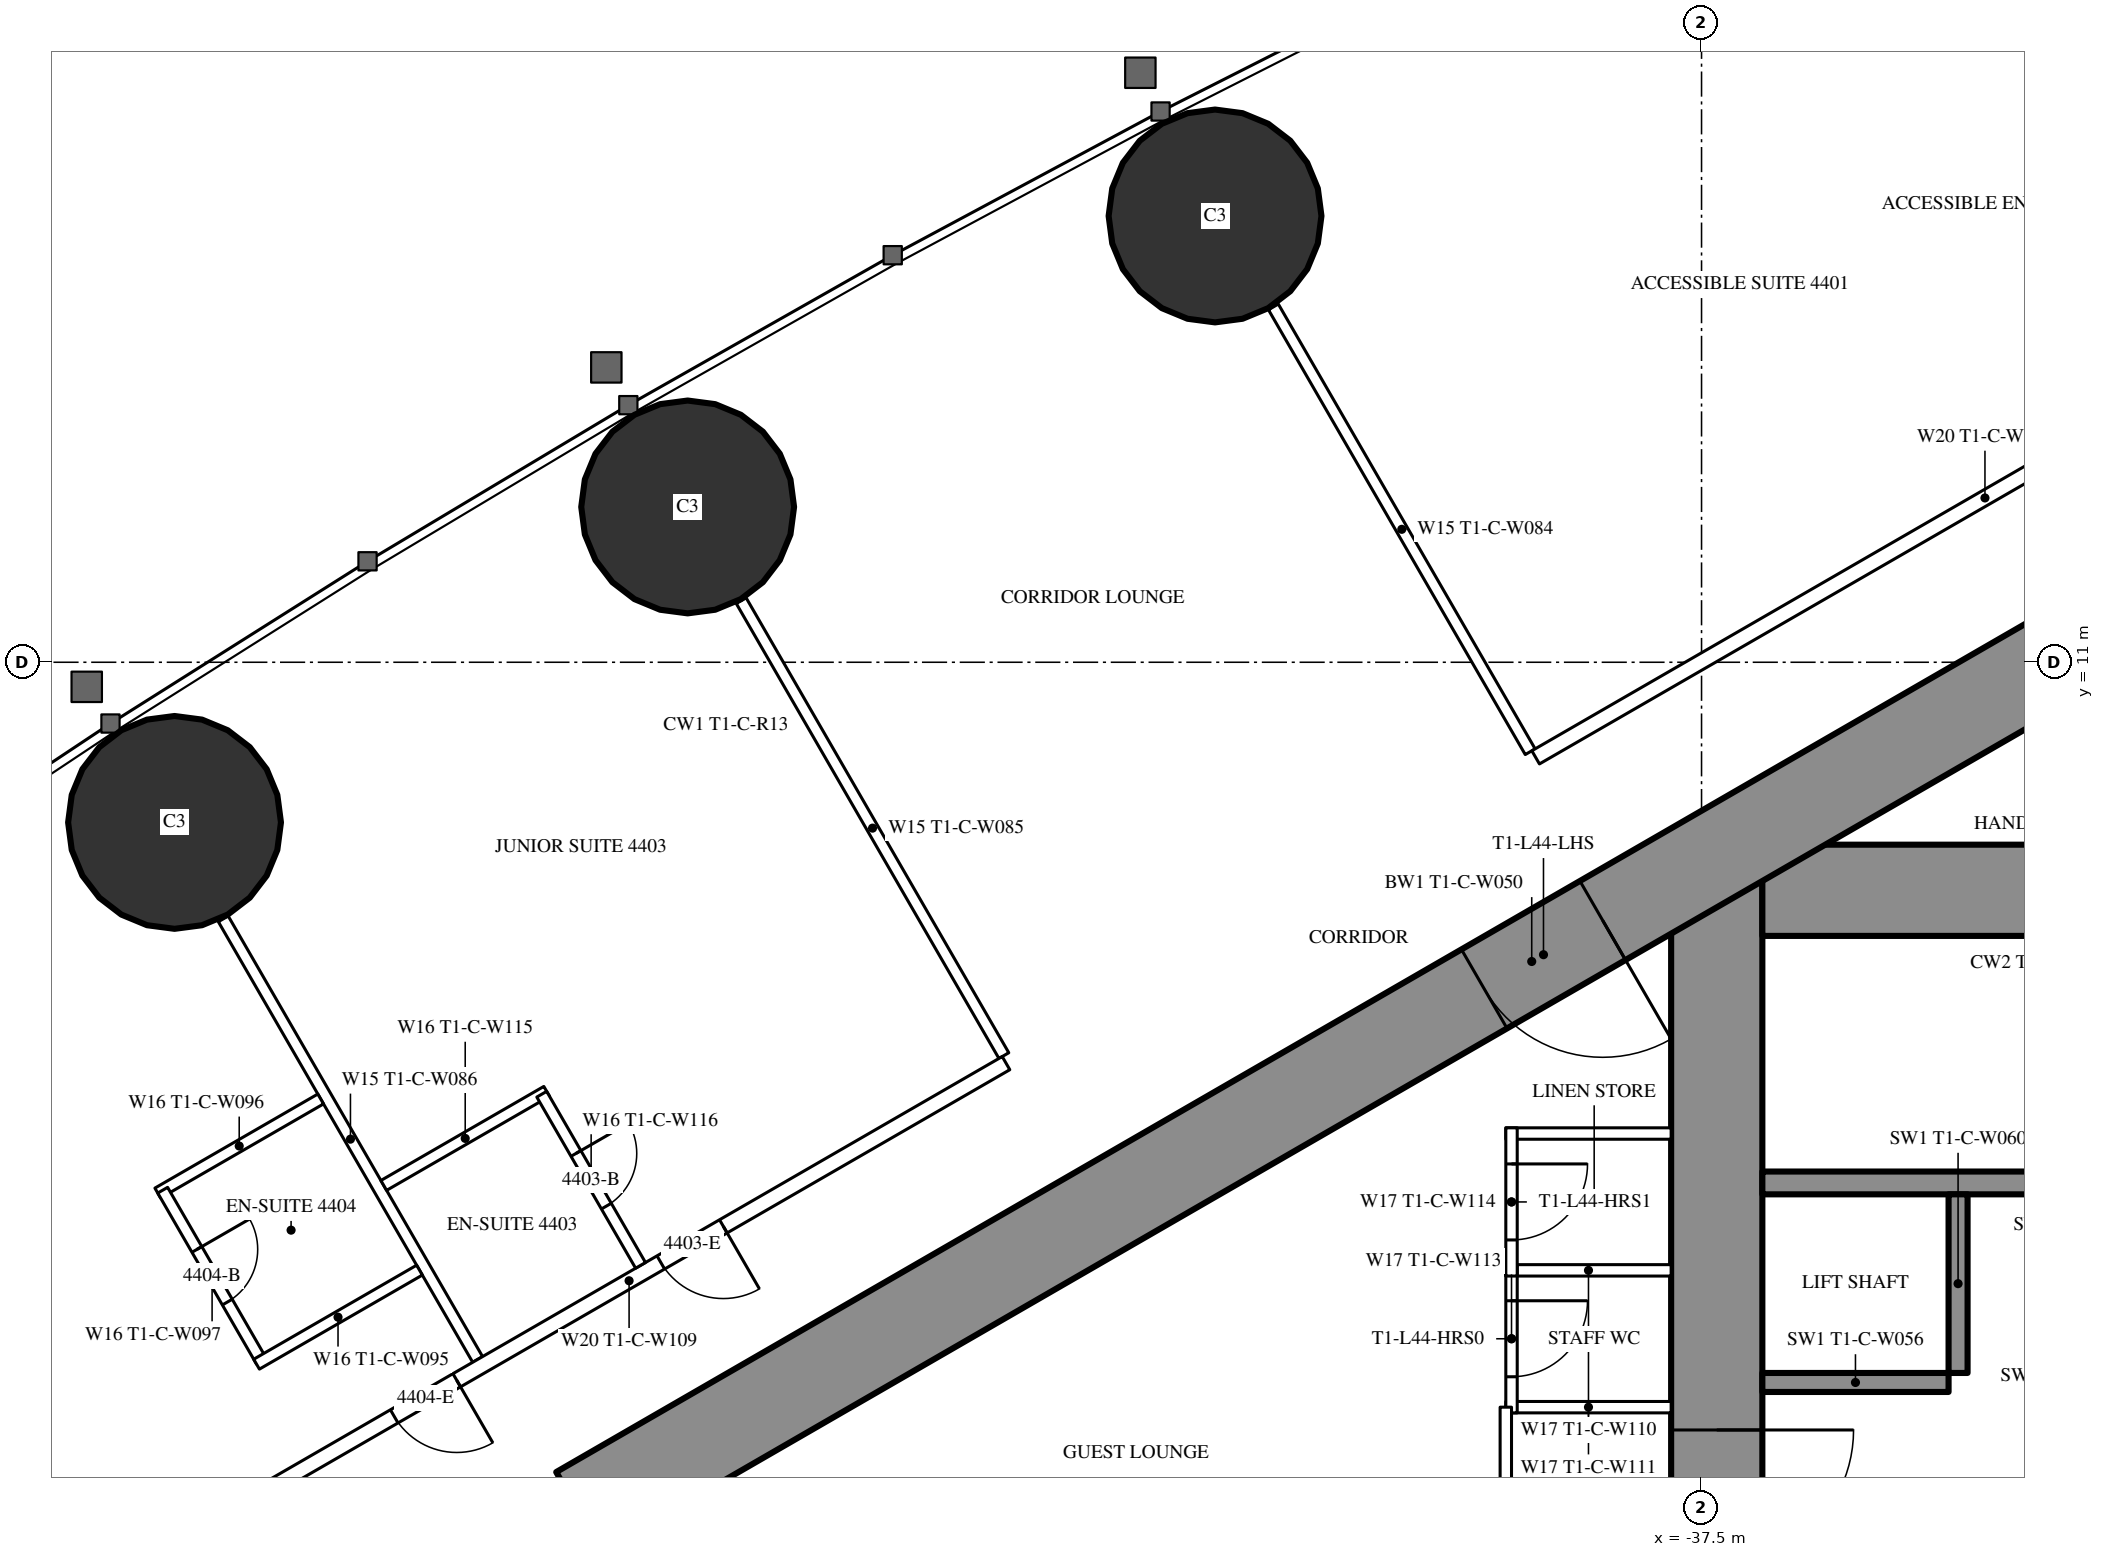
"""IFC4 building model, lengths in metres.
Left out: names, types, materials, properties, quantities, classifications, styles, units other than length and angle.
Written with IfcOpenShell. Run it as: python <this file> out.ifc"""

import sys

from ifc_helpers import new_model, si_unit, direction, frame, frame_2d, origin, origin_2d, place, context, subcontext, project, spatial, rectangle, circle, extrude, element, fill, save


model = new_model("IFC4")
c1 = context("Model", 3, precision=1e-05, world=origin(), true_north=direction((0.0, 1.0)))
c2 = subcontext(c1, "Body", "Model", "MODEL_VIEW")
j1 = project(units=[si_unit("LENGTHUNIT", "METRE"), si_unit("PLANEANGLEUNIT", "RADIAN")], contexts=[c1])
p1 = place(None, origin())
s1 = spatial("IfcSite", under=j1, at=p1, CompositionType="ELEMENT")
p2 = place(p1, origin())
s2 = spatial("IfcBuilding", under=s1, at=p2, CompositionType="ELEMENT")
p3 = place(p2, frame((0.0, 0.0, 166.8)))
s3 = spatial("IfcBuildingStorey", under=s2, at=p3, CompositionType="ELEMENT", Elevation=166.8)
for number, where, z_axis, x_axis in (
    (1, (-43.9, 16.871, 0.0), (0.0, 0.0, 1.0), (1.0, 0.0, 0.0)),
    (2, (-50.839, 13.043, 0.0), (0.0, 0.0, 1.0), (1.0, 0.0, 0.0)),
    (3, (-57.59, 8.893, 0.0), (0.0, 0.0, 1.0), (1.0, 0.0, 0.0)),
):
    element("IfcColumn", number, at=place(p3, frame(where, z_axis=z_axis, x_axis=x_axis)), inside=s3, PredefinedType="COLUMN", context=c2, shape_type="SweptSolid", body=[
        extrude(circle(Radius=1.4, at=origin_2d()), origin(), (0.0, 0.0, 1.0), 3.5),
    ])
p4 = place(p3, frame((-37.3, 8.6, 0.0), z_axis=(0.0, 0.0, 1.0), x_axis=(0.0, -1.0, 0.0)))
e4 = element("IfcWall", 4, at=p4, inside=s3, PredefinedType="SHEAR", context=c2, shape_type="SweptSolid", body=[
    extrude(rectangle(XDim=17.2, YDim=1.2, at=frame_2d((8.6, 0.0))), origin(), (0.0, 0.0, 1.0), 3.5),
])
p5 = place(p4, frame((7.7, 0.0, 0.0)))
e5 = element("IfcOpeningElement", 5, at=p5, cuts=e4, PredefinedType="OPENING", context=c2, shape_type="SweptSolid", body=[
    extrude(rectangle(XDim=1.8, YDim=2.2, at=frame_2d((0.9, 1.1))), frame((0.0, 0.61, 0.0), z_axis=(0.0, -1.0, 0.0), x_axis=(1.0, 0.0, 0.0)), (0.0, 0.0, 1.0), 1.22),
])
p6 = place(p3, frame((-28.3, 8.0, 0.0), z_axis=(0.0, 0.0, 1.0), x_axis=(-1.0, 0.0, 0.0)))
e6 = element("IfcWall", 6, at=p6, inside=s3, PredefinedType="SHEAR", context=c2, shape_type="SweptSolid", body=[
    extrude(rectangle(XDim=8.4, YDim=1.2, at=frame_2d((4.2, 0.0))), origin(), (0.0, 0.0, 1.0), 3.5),
])
p7 = place(p6, frame((0.25, 0.0, 0.0)))
e7 = element("IfcOpeningElement", 7, at=p7, cuts=e6, PredefinedType="OPENING", context=c2, shape_type="SweptSolid", body=[
    extrude(rectangle(XDim=1.0, YDim=2.2, at=frame_2d((0.5, 1.1))), frame((0.0, 0.61, 0.0), z_axis=(0.0, -1.0, 0.0), x_axis=(1.0, 0.0, 0.0)), (0.0, 0.0, 1.0), 1.22),
])
p8 = place(p3, frame((-28.3, 4.15, 0.0), z_axis=(0.0, 0.0, 1.0), x_axis=(-1.0, 0.0, 0.0)))
e8 = element("IfcWall", 8, at=p8, inside=s3, PredefinedType="SHEAR", context=c2, shape_type="SweptSolid", body=[
    extrude(rectangle(XDim=8.4, YDim=0.3, at=frame_2d((4.2, 0.0))), origin(), (0.0, 0.0, 1.0), 3.5),
])
p9 = place(p3, frame((-34.125, 4.0, 0.0), z_axis=(0.0, 0.0, 1.0), x_axis=(0.0, -1.0, 0.0)))
e9 = element("IfcWall", 9, at=p9, inside=s3, PredefinedType="SHEAR", context=c2, shape_type="SweptSolid", body=[
    extrude(rectangle(XDim=2.35, YDim=0.25, at=frame_2d((1.175, 0.0))), origin(), (0.0, 0.0, 1.0), 3.5),
])
p10 = place(p3, frame((-34.25, 1.525, 0.0), z_axis=(0.0, 0.0, 1.0), x_axis=(-1.0, 0.0, 0.0)))
e10 = element("IfcWall", 10, at=p10, inside=s3, PredefinedType="SHEAR", context=c2, shape_type="SweptSolid", body=[
    extrude(rectangle(XDim=2.45, YDim=0.25, at=frame_2d((1.225, 0.0))), origin(), (0.0, 0.0, 1.0), 3.5),
])
p11 = place(p3, frame((-27.2, 14.3, 0.0), z_axis=(0.0, 0.0, 1.0), x_axis=(-0.866026593062, -0.499997940104, 0.0)))
e11 = element("IfcWall", 11, at=p11, inside=s3, PredefinedType="SHEAR", context=c2, shape_type="SweptSolid", body=[
    extrude(rectangle(XDim=28.946, YDim=1.2, at=frame_2d((14.473, 0.0))), origin(), (0.0, 0.0, 1.0), 3.5),
])
p12 = place(p11, frame((4.6, 0.0, 0.0)))
e12 = element("IfcOpeningElement", 12, at=p12, cuts=e11, PredefinedType="OPENING", context=c2, shape_type="SweptSolid", body=[
    extrude(rectangle(XDim=1.0, YDim=2.2, at=frame_2d((0.5, 1.1))), frame((0.0, 0.61, 0.0), z_axis=(0.0, -1.0, 0.0), x_axis=(1.0, 0.0, 0.0)), (0.0, 0.0, 1.0), 1.22),
])
p13 = place(p11, frame((13.395, 0.0, 0.0)))
e13 = element("IfcOpeningElement", 13, at=p13, cuts=e11, PredefinedType="OPENING", context=c2, shape_type="SweptSolid", body=[
    extrude(rectangle(XDim=1.8, YDim=2.2, at=frame_2d((0.9, 1.1))), frame((0.0, 0.61, 0.0), z_axis=(0.0, -1.0, 0.0), x_axis=(1.0, 0.0, 0.0)), (0.0, 0.0, 1.0), 1.22),
])
p14 = place(p3, frame((-39.754, 9.823, 0.0), z_axis=(0.0, 0.0, 1.0), x_axis=(-0.499997670926, 0.866026748472, 0.0)))
e14 = element("IfcWall", 14, at=p14, inside=s3, PredefinedType="PARTITIONING", context=c2, shape_type="SweptSolid", body=[
    extrude(rectangle(XDim=6.757, YDim=0.15, at=frame_2d((3.379, 0.0))), origin(), (0.0, 0.0, 1.0), 2.3),
])
p15 = place(p3, frame((-46.679, 5.825, 0.0), z_axis=(0.0, 0.0, 1.0), x_axis=(-0.500006839597, 0.866021454905, 0.0)))
e15 = element("IfcWall", 15, at=p15, inside=s3, PredefinedType="PARTITIONING", context=c2, shape_type="SweptSolid", body=[
    extrude(rectangle(XDim=6.911, YDim=0.15, at=frame_2d((3.456, 0.0))), origin(), (0.0, 0.0, 1.0), 2.3),
])
p16 = place(p3, frame((-53.602, 1.828, 0.0), z_axis=(0.0, 0.0, 1.0), x_axis=(-0.49999191814, 0.866030069798, 0.0)))
e16 = element("IfcWall", 16, at=p16, inside=s3, PredefinedType="PARTITIONING", context=c2, shape_type="SweptSolid", body=[
    extrude(rectangle(XDim=6.692, YDim=0.15, at=frame_2d((3.346, 0.0))), origin(), (0.0, 0.0, 1.0), 2.3),
])
p17 = place(p3, frame((-27.86, 16.575, 0.0), z_axis=(0.0, 0.0, 1.0), x_axis=(-0.866026850238, -0.499997494661, 0.0)))
e17 = element("IfcWall", 17, at=p17, inside=s3, PredefinedType="PARTITIONING", context=c2, shape_type="SweptSolid", body=[
    extrude(rectangle(XDim=13.651, YDim=0.2, at=frame_2d((6.826, 0.0))), origin(), (0.0, 0.0, 1.0), 3.25),
])
p18 = place(p17, frame((3.75, 0.0, 0.0)))
e18 = element("IfcOpeningElement", 18, at=p18, cuts=e17, PredefinedType="OPENING", context=c2, shape_type="SweptSolid", body=[
    extrude(rectangle(XDim=1.0, YDim=2.2, at=frame_2d((0.5, 1.1))), frame((0.0, 0.11, 0.0), z_axis=(0.0, -1.0, 0.0), x_axis=(1.0, 0.0, 0.0)), (0.0, 0.0, 1.0), 0.22),
])
p19 = place(p3, frame((-46.65, 5.726, 0.0), z_axis=(0.0, 0.0, 1.0), x_axis=(-0.866027963864, -0.499995565786, 0.0)))
e19 = element("IfcWall", 19, at=p19, inside=s3, PredefinedType="PARTITIONING", context=c2, shape_type="SweptSolid", body=[
    extrude(rectangle(XDim=11.452, YDim=0.2, at=frame_2d((5.726, 0.0))), origin(), (0.0, 0.0, 1.0), 3.25),
])
p20 = place(p19, frame((4.294, 0.0, 0.0)))
e20 = element("IfcOpeningElement", 20, at=p20, cuts=e19, PredefinedType="OPENING", context=c2, shape_type="SweptSolid", body=[
    extrude(rectangle(XDim=0.95, YDim=2.2, at=frame_2d((0.475, 1.1))), frame((0.0, 0.11, 0.0), z_axis=(0.0, -1.0, 0.0), x_axis=(1.0, 0.0, 0.0)), (0.0, 0.0, 1.0), 0.22),
])
p21 = place(p19, frame((8.344, 0.0, 0.0)))
e21 = element("IfcOpeningElement", 21, at=p21, cuts=e19, PredefinedType="OPENING", context=c2, shape_type="SweptSolid", body=[
    extrude(rectangle(XDim=0.95, YDim=2.2, at=frame_2d((0.475, 1.1))), frame((0.0, 0.11, 0.0), z_axis=(0.0, -1.0, 0.0), x_axis=(1.0, 0.0, 0.0)), (0.0, 0.0, 1.0), 0.22),
])
p22 = place(p3, frame((-52.694, 5.355, 0.0), z_axis=(0.0, 0.0, 1.0), x_axis=(-0.866031185235, -0.4999899861, 0.0)))
e22 = element("IfcWall", 22, at=p22, inside=s3, PredefinedType="PARTITIONING", context=c2, shape_type="SweptSolid", body=[
    extrude(rectangle(XDim=2.475, YDim=0.15, at=frame_2d((1.238, 0.0))), origin(), (0.0, 0.0, 1.0), 3.25),
])
p23 = place(p3, frame((-51.459, 3.065, 0.0), z_axis=(0.0, 0.0, 1.0), x_axis=(-0.499936506574, 0.866062058628, 0.0)))
e23 = element("IfcWall", 23, at=p23, inside=s3, PredefinedType="PARTITIONING", context=c2, shape_type="SweptSolid", body=[
    extrude(rectangle(XDim=2.6, YDim=0.15, at=frame_2d((1.3, 0.0))), origin(), (0.0, 0.0, 1.0), 3.25),
])
p24 = place(p23, frame((0.9, 0.0, 0.0)))
e24 = element("IfcOpeningElement", 24, at=p24, cuts=e23, PredefinedType="OPENING", context=c2, shape_type="SweptSolid", body=[
    extrude(rectangle(XDim=0.8, YDim=2.2, at=frame_2d((0.4, 1.1))), frame((0.0, 0.085, 0.0), z_axis=(0.0, -1.0, 0.0), x_axis=(1.0, 0.0, 0.0)), (0.0, 0.0, 1.0), 0.17),
])
p25 = place(p3, frame((-55.667, 5.255, 0.0), z_axis=(0.0, 0.0, 1.0), x_axis=(-0.866006523861, -0.500032699561, 0.0)))
e25 = element("IfcWall", 25, at=p25, inside=s3, PredefinedType="PARTITIONING", context=c2, shape_type="SweptSolid", body=[
    extrude(rectangle(XDim=2.475, YDim=0.15, at=frame_2d((1.237, 0.0))), origin(), (0.0, 0.0, 1.0), 3.25),
])
p26 = place(p3, frame((-56.446, 1.803, 0.0), z_axis=(0.0, 0.0, 1.0), x_axis=(-0.499936506574, 0.866062058628, 0.0)))
e26 = element("IfcWall", 26, at=p26, inside=s3, PredefinedType="PARTITIONING", context=c2, shape_type="SweptSolid", body=[
    extrude(rectangle(XDim=2.6, YDim=0.15, at=frame_2d((1.3, 0.0))), origin(), (0.0, 0.0, 1.0), 3.25),
])
p27 = place(p26, frame((0.9, 0.0, 0.0)))
e27 = element("IfcOpeningElement", 27, at=p27, cuts=e26, PredefinedType="OPENING", context=c2, shape_type="SweptSolid", body=[
    extrude(rectangle(XDim=0.8, YDim=2.2, at=frame_2d((0.4, 1.1))), frame((0.0, 0.085, 0.0), z_axis=(0.0, -1.0, 0.0), x_axis=(1.0, 0.0, 0.0)), (0.0, 0.0, 1.0), 0.17),
])
p28 = place(p3, frame((-54.367, 3.003, 0.0), z_axis=(0.0, 0.0, 1.0), x_axis=(-0.866031185235, -0.4999899861, 0.0)))
e28 = element("IfcWall", 28, at=p28, inside=s3, PredefinedType="PARTITIONING", context=c2, shape_type="SweptSolid", body=[
    extrude(rectangle(XDim=2.475, YDim=0.15, at=frame_2d((1.238, 0.0))), origin(), (0.0, 0.0, 1.0), 3.25),
])
for number, where, z_axis, x_axis in (
    (29, (-37.9, 1.2, 0.0), (0.0, 0.0, 1.0), (-1.0, 0.0, 0.0)),
    (30, (-37.9, 3.0, 0.0), (0.0, 0.0, 1.0), (-1.0, 0.0, 0.0)),
    (31, (-37.9, 4.8, 0.0), (0.0, 0.0, 1.0), (-1.0, 0.0, 0.0)),
):
    element("IfcWall", number, at=place(p3, frame(where, z_axis=z_axis, x_axis=x_axis)), inside=s3, PredefinedType="PARTITIONING", context=c2, shape_type="SweptSolid", body=[
        extrude(rectangle(XDim=2.175, YDim=0.15, at=frame_2d((1.087, 0.0))), origin(), (0.0, 0.0, 1.0), 3.25),
    ])
p29 = place(p3, frame((-40.0, 3.075, 0.0), z_axis=(0.0, 0.0, 1.0), x_axis=(0.0, -1.0, 0.0)))
e32 = element("IfcWall", 32, at=p29, inside=s3, PredefinedType="PARTITIONING", context=c2, shape_type="SweptSolid", body=[
    extrude(rectangle(XDim=1.95, YDim=0.15, at=frame_2d((0.975, 0.0))), origin(), (0.0, 0.0, 1.0), 3.25),
])
p30 = place(p29, frame((0.475, 0.0, 0.0)))
e33 = element("IfcOpeningElement", 33, at=p30, cuts=e32, PredefinedType="OPENING", context=c2, shape_type="SweptSolid", body=[
    extrude(rectangle(XDim=1.0, YDim=2.2, at=frame_2d((0.5, 1.1))), frame((0.0, 0.085, 0.0), z_axis=(0.0, -1.0, 0.0), x_axis=(1.0, 0.0, 0.0)), (0.0, 0.0, 1.0), 0.17),
])
p31 = place(p3, frame((-40.0, 4.875, 0.0), z_axis=(0.0, 0.0, 1.0), x_axis=(0.0, -1.0, 0.0)))
e34 = element("IfcWall", 34, at=p31, inside=s3, PredefinedType="PARTITIONING", context=c2, shape_type="SweptSolid", body=[
    extrude(rectangle(XDim=1.95, YDim=0.15, at=frame_2d((0.975, 0.0))), origin(), (0.0, 0.0, 1.0), 3.25),
])
p32 = place(p31, frame((0.475, 0.0, 0.0)))
e35 = element("IfcOpeningElement", 35, at=p32, cuts=e34, PredefinedType="OPENING", context=c2, shape_type="SweptSolid", body=[
    extrude(rectangle(XDim=1.0, YDim=2.2, at=frame_2d((0.5, 1.1))), frame((0.0, 0.085, 0.0), z_axis=(0.0, -1.0, 0.0), x_axis=(1.0, 0.0, 0.0)), (0.0, 0.0, 1.0), 0.17),
])
p33 = place(p3, frame((-40.075, 1.2, 0.0), z_axis=(0.0, 0.0, 1.0), x_axis=(0.0, -1.0, 0.0)))
e36 = element("IfcWall", 36, at=p33, inside=s3, PredefinedType="PARTITIONING", context=c2, shape_type="SweptSolid", body=[
    extrude(rectangle(XDim=7.374, YDim=0.15, at=frame_2d((3.687, 0.0))), origin(), (0.0, 0.0, 1.0), 3.25),
])
p34 = place(p33, frame((2.787, 0.0, 0.0)))
e37 = element("IfcOpeningElement", 37, at=p34, cuts=e36, PredefinedType="OPENING", context=c2, shape_type="SweptSolid", body=[
    extrude(rectangle(XDim=1.8, YDim=2.2, at=frame_2d((0.9, 1.1))), frame((0.0, 0.085, 0.0), z_axis=(0.0, -1.0, 0.0), x_axis=(1.0, 0.0, 0.0)), (0.0, 0.0, 1.0), 0.17),
])
p35 = place(p24, origin())
e38 = element("IfcDoor", 38, at=p35, inside=s3, OperationType="SINGLE_SWING_RIGHT", PredefinedType="DOOR", context=c2, shape_type="SweptSolid", body=[
    extrude(rectangle(XDim=0.8, YDim=2.2, at=frame_2d((0.4, 1.1))), frame((0.0, 0.025, 0.0), z_axis=(0.0, -1.0, 0.0), x_axis=(1.0, 0.0, 0.0)), (0.0, 0.0, 1.0), 0.05),
])
fill(e24, e38)
p36 = place(p20, origin())
e39 = element("IfcDoor", 39, at=p36, inside=s3, OperationType="SINGLE_SWING_LEFT", PredefinedType="DOOR", context=c2, shape_type="SweptSolid", body=[
    extrude(rectangle(XDim=0.95, YDim=2.2, at=frame_2d((0.475, 1.1))), frame((0.0, 0.025, 0.0), z_axis=(0.0, -1.0, 0.0), x_axis=(1.0, 0.0, 0.0)), (0.0, 0.0, 1.0), 0.05),
])
fill(e20, e39)
p37 = place(p27, origin())
e40 = element("IfcDoor", 40, at=p37, inside=s3, OperationType="SINGLE_SWING_RIGHT", PredefinedType="DOOR", context=c2, shape_type="SweptSolid", body=[
    extrude(rectangle(XDim=0.8, YDim=2.2, at=frame_2d((0.4, 1.1))), frame((0.0, 0.025, 0.0), z_axis=(0.0, -1.0, 0.0), x_axis=(1.0, 0.0, 0.0)), (0.0, 0.0, 1.0), 0.05),
])
fill(e27, e40)
p38 = place(p21, origin())
e41 = element("IfcDoor", 41, at=p38, inside=s3, OperationType="SINGLE_SWING_LEFT", PredefinedType="DOOR", context=c2, shape_type="SweptSolid", body=[
    extrude(rectangle(XDim=0.95, YDim=2.2, at=frame_2d((0.475, 1.1))), frame((0.0, 0.025, 0.0), z_axis=(0.0, -1.0, 0.0), x_axis=(1.0, 0.0, 0.0)), (0.0, 0.0, 1.0), 0.05),
])
fill(e21, e41)
p39 = place(p30, origin())
e42 = element("IfcDoor", 42, at=p39, inside=s3, OperationType="SINGLE_SWING_LEFT", PredefinedType="DOOR", context=c2, shape_type="SweptSolid", body=[
    extrude(rectangle(XDim=1.0, YDim=2.2, at=frame_2d((0.5, 1.1))), frame((0.0, 0.025, 0.0), z_axis=(0.0, -1.0, 0.0), x_axis=(1.0, 0.0, 0.0)), (0.0, 0.0, 1.0), 0.05),
])
fill(e33, e42)
p40 = place(p32, origin())
e43 = element("IfcDoor", 43, at=p40, inside=s3, OperationType="SINGLE_SWING_LEFT", PredefinedType="DOOR", context=c2, shape_type="SweptSolid", body=[
    extrude(rectangle(XDim=1.0, YDim=2.2, at=frame_2d((0.5, 1.1))), frame((0.0, 0.025, 0.0), z_axis=(0.0, -1.0, 0.0), x_axis=(1.0, 0.0, 0.0)), (0.0, 0.0, 1.0), 0.05),
])
fill(e35, e43)
p41 = place(p13, origin())
e44 = element("IfcDoor", 44, at=p41, inside=s3, OperationType="DOUBLE_DOOR_SINGLE_SWING", PredefinedType="DOOR", context=c2, shape_type="SweptSolid", body=[
    extrude(rectangle(XDim=1.8, YDim=2.2, at=frame_2d((0.9, 1.1))), frame((0.0, 0.025, 0.0), z_axis=(0.0, -1.0, 0.0), x_axis=(1.0, 0.0, 0.0)), (0.0, 0.0, 1.0), 0.05),
])
fill(e13, e44)
p42 = place(p5, origin())
e45 = element("IfcDoor", 45, at=p42, inside=s3, OperationType="DOUBLE_DOOR_SINGLE_SWING", PredefinedType="DOOR", context=c2, shape_type="SweptSolid", body=[
    extrude(rectangle(XDim=1.8, YDim=2.2, at=frame_2d((0.9, 1.1))), frame((0.0, 0.025, 0.0), z_axis=(0.0, -1.0, 0.0), x_axis=(1.0, 0.0, 0.0)), (0.0, 0.0, 1.0), 0.05),
])
fill(e5, e45)
save(model, sys.argv[1])
